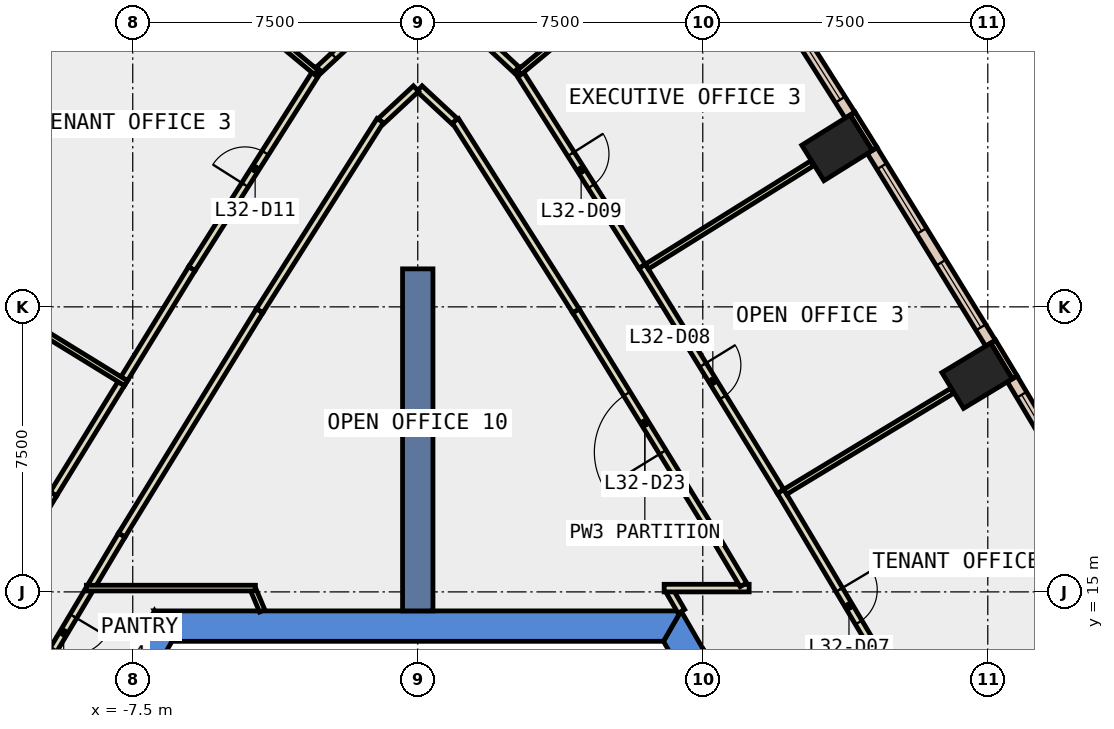
"""IFC4 building model, lengths in metres.
Left out: names, types, materials, properties, quantities, classifications, styles, units other than length and angle.
Written with IfcOpenShell. Run it as: python <this file> out.ifc"""

import sys

from ifc_helpers import new_model, si_unit, direction, frame, frame_2d, origin, origin_2d, place, context, subcontext, project, spatial, polyline, rectangle, outline, extrude, element, fill, save


model = new_model("IFC4")
c1 = context("Model", 3, precision=1e-05, world=origin(), true_north=direction((0.0, 1.0)))
c2 = subcontext(c1, "Body", "Model", "MODEL_VIEW")
j1 = project(units=[si_unit("LENGTHUNIT", "METRE"), si_unit("PLANEANGLEUNIT", "RADIAN")], contexts=[c1])
p1 = place(None, origin())
s1 = spatial("IfcSite", under=j1, at=p1, CompositionType="ELEMENT")
p2 = place(p1, origin())
s2 = spatial("IfcBuilding", under=s1, at=p2, CompositionType="ELEMENT")
p3 = place(p2, frame((0.0, 0.0, 146.6)))
s3 = spatial("IfcBuildingStorey", under=s2, at=p3, CompositionType="ELEMENT", Elevation=146.6)
for number, where, z_axis, x_axis in (
    (1, (14.719, 20.688, -0.4), (0.0, 0.0, 1.0), (-0.518, 0.855, 0.0)),
    (2, (11.033, 26.684, -0.4), (0.0, 0.0, 1.0), (-0.53, 0.848, 0.0)),
):
    element("IfcColumn", number, at=place(p3, frame(where, z_axis=z_axis, x_axis=x_axis)), inside=s3, PredefinedType="COLUMN", context=c2, shape_type="SweptSolid", body=[
        extrude(rectangle(XDim=1.1, YDim=1.5, at=origin_2d()), origin(), (0.0, 0.0, 1.0), 4.2),
    ])
p4 = place(p3, frame((0.0, 0.0, -0.4)))
e3 = element("IfcWall", 3, at=p4, inside=s3, PredefinedType="SHEAR", context=c2, shape_type="SweptSolid", body=[
    extrude(outline(polyline([(6.824, 13.08), (7.517, 13.48), (6.928, 14.5), (6.466, 13.7), (6.824, 13.08)])), origin(), (0.0, 0.0, 1.0), 4.2),
])
p5 = place(p3, frame((0.0, 0.0, -0.4)))
e4 = element("IfcWall", 4, at=p5, inside=s3, PredefinedType="SHEAR", context=c2, shape_type="SweptSolid", body=[
    extrude(outline(polyline([(6.928, 14.5), (-6.928, 14.5), (-6.466, 13.7), (6.466, 13.7), (6.928, 14.5)])), origin(), (0.0, 0.0, 1.0), 4.2),
])
p6 = place(p3, frame((0.0, 0.0, -0.4)))
e5 = element("IfcWall", 5, at=p6, inside=s3, PredefinedType="SHEAR", context=c2, shape_type="SweptSolid", body=[
    extrude(outline(polyline([(-12.267, 5.252), (-11.575, 4.852), (-6.466, 13.7), (-6.928, 14.5), (-12.267, 5.252)])), origin(), (0.0, 0.0, 1.0), 4.2),
])
p7 = place(p3, frame((0.0, 14.5, -0.4), z_axis=(0.0, 0.0, 1.0), x_axis=(0.0, 1.0, 0.0)))
e6 = element("IfcWall", 6, at=p7, inside=s3, PredefinedType="SHEAR", context=c2, shape_type="SweptSolid", body=[
    extrude(rectangle(XDim=9.0, YDim=0.8, at=frame_2d((4.5, 0.0))), origin(), (0.0, 0.0, 1.0), 4.2),
])
for number, where, z_axis, x_axis in (
    (7, (15.71, 20.645, 0.0), (0.0, 0.0, 1.0), (-0.518, 0.855, 0.0)),
    (8, (12.024, 26.655, 0.0), (0.0, 0.0, 1.0), (-0.53, 0.848, 0.0)),
):
    element("IfcWall", number, at=place(p3, frame(where, z_axis=z_axis, x_axis=x_axis)), inside=s3, PredefinedType="STANDARD", context=c2, shape_type="SweptSolid", body=[
        extrude(rectangle(XDim=1.1, YDim=0.15, at=frame_2d((0.55, 0.0))), origin(), (0.0, 0.0, 1.0), 3.8),
    ])
p8 = place(p3, frame((18.688, 15.493, 0.0), z_axis=(0.0, 0.0, 1.0), x_axis=(-0.511856715331, 0.859070836992, 0.0)))
e9 = element("IfcWall", 9, at=p8, inside=s3, PredefinedType="STANDARD", context=c2, shape_type="SweptSolid", body=[
    extrude(rectangle(XDim=5.951, YDim=0.3, at=frame_2d((2.975, 0.0))), origin(), (0.0, 0.0, 1.0), 3.8),
])
p9 = place(p8, frame((0.488, 0.0, 0.9)))
e10 = element("IfcOpeningElement", 10, at=p9, cuts=e9, PredefinedType="OPENING", context=c2, shape_type="SweptSolid", body=[
    extrude(rectangle(XDim=2.0, YDim=2.6, at=frame_2d((1.0, 1.3))), frame((0.0, 0.16, 0.0), z_axis=(0.0, -1.0, 0.0), x_axis=(1.0, 0.0, 0.0)), (0.0, 0.0, 1.0), 0.32),
])
p10 = place(p8, frame((3.463, 0.0, 0.9)))
e11 = element("IfcOpeningElement", 11, at=p10, cuts=e9, PredefinedType="OPENING", context=c2, shape_type="SweptSolid", body=[
    extrude(rectangle(XDim=2.0, YDim=2.6, at=frame_2d((1.0, 1.3))), frame((0.0, 0.16, 0.0), z_axis=(0.0, -1.0, 0.0), x_axis=(1.0, 0.0, 0.0)), (0.0, 0.0, 1.0), 0.32),
])
p11 = place(p3, frame((15.073, 21.544, 0.0), z_axis=(0.0, 0.0, 1.0), x_axis=(-0.523719731127, 0.851890628677, 0.0)))
e12 = element("IfcWall", 12, at=p11, inside=s3, PredefinedType="STANDARD", context=c2, shape_type="SweptSolid", body=[
    extrude(rectangle(XDim=5.952, YDim=0.3, at=frame_2d((2.976, 0.0))), origin(), (0.0, 0.0, 1.0), 3.8),
])
p12 = place(p11, frame((0.488, 0.0, 0.9)))
e13 = element("IfcOpeningElement", 13, at=p12, cuts=e12, PredefinedType="OPENING", context=c2, shape_type="SweptSolid", body=[
    extrude(rectangle(XDim=2.0, YDim=2.6, at=frame_2d((1.0, 1.3))), frame((0.0, 0.16, 0.0), z_axis=(0.0, -1.0, 0.0), x_axis=(1.0, 0.0, 0.0)), (0.0, 0.0, 1.0), 0.32),
])
p13 = place(p11, frame((3.464, 0.0, 0.9)))
e14 = element("IfcOpeningElement", 14, at=p13, cuts=e12, PredefinedType="OPENING", context=c2, shape_type="SweptSolid", body=[
    extrude(rectangle(XDim=2.0, YDim=2.6, at=frame_2d((1.0, 1.3))), frame((0.0, 0.16, 0.0), z_axis=(0.0, -1.0, 0.0), x_axis=(1.0, 0.0, 0.0)), (0.0, 0.0, 1.0), 0.32),
])
p14 = place(p3, frame((11.375, 27.545, 0.0), z_axis=(0.0, 0.0, 1.0), x_axis=(-0.535403761464, 0.844596242124, 0.0)))
e15 = element("IfcWall", 15, at=p14, inside=s3, PredefinedType="STANDARD", context=c2, shape_type="SweptSolid", body=[
    extrude(rectangle(XDim=5.928, YDim=0.3, at=frame_2d((2.964, 0.0))), origin(), (0.0, 0.0, 1.0), 3.8),
])
p15 = place(p14, frame((0.482, 0.0, 0.9)))
e16 = element("IfcOpeningElement", 16, at=p15, cuts=e15, PredefinedType="OPENING", context=c2, shape_type="SweptSolid", body=[
    extrude(rectangle(XDim=2.0, YDim=2.6, at=frame_2d((1.0, 1.3))), frame((0.0, 0.16, 0.0), z_axis=(0.0, -1.0, 0.0), x_axis=(1.0, 0.0, 0.0)), (0.0, 0.0, 1.0), 0.32),
])
p16 = place(p14, frame((3.446, 0.0, 0.9)))
e17 = element("IfcOpeningElement", 17, at=p16, cuts=e15, PredefinedType="OPENING", context=c2, shape_type="SweptSolid", body=[
    extrude(rectangle(XDim=2.0, YDim=2.6, at=frame_2d((1.0, 1.3))), frame((0.0, 0.16, 0.0), z_axis=(0.0, -1.0, 0.0), x_axis=(1.0, 0.0, 0.0)), (0.0, 0.0, 1.0), 0.32),
])
p17 = place(p3, frame((-8.201, 32.552, 0.0), z_axis=(0.0, 0.0, 1.0), x_axis=(-0.535403761464, -0.844596242124, 0.0)))
e18 = element("IfcWall", 18, at=p17, inside=s3, PredefinedType="STANDARD", context=c2, shape_type="SweptSolid", body=[
    extrude(rectangle(XDim=5.928, YDim=0.3, at=frame_2d((2.964, 0.0))), origin(), (0.0, 0.0, 1.0), 3.8),
])
p18 = place(p17, frame((0.482, 0.0, 0.9)))
e19 = element("IfcOpeningElement", 19, at=p18, cuts=e18, PredefinedType="OPENING", context=c2, shape_type="SweptSolid", body=[
    extrude(rectangle(XDim=2.0, YDim=2.6, at=frame_2d((1.0, 1.3))), frame((0.0, 0.16, 0.0), z_axis=(0.0, -1.0, 0.0), x_axis=(1.0, 0.0, 0.0)), (0.0, 0.0, 1.0), 0.32),
])
p19 = place(p17, frame((3.446, 0.0, 0.9)))
e20 = element("IfcOpeningElement", 20, at=p19, cuts=e18, PredefinedType="OPENING", context=c2, shape_type="SweptSolid", body=[
    extrude(rectangle(XDim=2.0, YDim=2.6, at=frame_2d((1.0, 1.3))), frame((0.0, 0.16, 0.0), z_axis=(0.0, -1.0, 0.0), x_axis=(1.0, 0.0, 0.0)), (0.0, 0.0, 1.0), 0.32),
])
p20 = place(p3, frame((-8.658, 15.036, 0.0), z_axis=(0.0, 0.0, 1.0), x_axis=(-0.511860217954, -0.859068750029, 0.0)))
e21 = element("IfcWall", 21, at=p20, inside=s3, PredefinedType="PARTITIONING", context=c2, shape_type="SweptSolid", body=[
    extrude(rectangle(XDim=2.577, YDim=0.2, at=frame_2d((1.289, 0.0))), origin(), (0.0, 0.0, 1.0), 3.8),
])
p21 = place(p20, frame((0.788, 0.0, 0.0)))
e22 = element("IfcOpeningElement", 22, at=p21, cuts=e21, PredefinedType="OPENING", context=c2, shape_type="SweptSolid", body=[
    extrude(rectangle(XDim=1.0, YDim=2.1, at=frame_2d((0.5, 1.05))), frame((0.0, 0.11, 0.0), z_axis=(0.0, -1.0, 0.0), x_axis=(1.0, 0.0, 0.0)), (0.0, 0.0, 1.0), 0.22),
])
p22 = place(p3, frame((6.937, 14.488, 0.0), z_axis=(0.0, 0.0, 1.0), x_axis=(-0.499908430952, 0.866078264744, 0.0)))
e23 = element("IfcWall", 23, at=p22, inside=s3, PredefinedType="PARTITIONING", context=c2, shape_type="SweptSolid", body=[
    extrude(rectangle(XDim=0.606, YDim=0.2, at=frame_2d((0.303, 0.0))), origin(), (0.0, 0.0, 1.0), 3.8),
])
p23 = place(p3, frame((6.484, 15.1, 0.0), z_axis=(0.0, 0.0, 1.0), x_axis=(1.0, 0.0, 0.0)))
e24 = element("IfcWall", 24, at=p23, inside=s3, PredefinedType="PARTITIONING", context=c2, shape_type="SweptSolid", body=[
    extrude(rectangle(XDim=2.236, YDim=0.2, at=frame_2d((1.118, 0.0))), origin(), (0.0, 0.0, 1.0), 3.8),
])
p24 = place(p3, frame((8.569, 15.186, 0.0), z_axis=(0.0, 0.0, 1.0), x_axis=(-0.512230585803, 0.85884796499, 0.0)))
e25 = element("IfcWall", 25, at=p24, inside=s3, PredefinedType="PARTITIONING", context=c2, shape_type="SweptSolid", body=[
    extrude(rectangle(XDim=1.523, YDim=0.2, at=frame_2d((0.761, 0.0))), origin(), (0.0, 0.0, 1.0), 3.8),
])
p25 = place(p3, frame((7.789, 16.494, 0.0), z_axis=(0.0, 0.0, 1.0), x_axis=(-0.523625371849, 0.851948631055, 0.0)))
e26 = element("IfcWall", 26, at=p25, inside=s3, PredefinedType="PARTITIONING", context=c2, shape_type="SweptSolid", body=[
    extrude(rectangle(XDim=6.927, YDim=0.2, at=frame_2d((3.463, 0.0))), origin(), (0.0, 0.0, 1.0), 3.8),
])
p26 = place(p25, frame((2.564, 0.0, 0.0)))
e27 = element("IfcOpeningElement", 27, at=p26, cuts=e26, PredefinedType="OPENING", context=c2, shape_type="SweptSolid", body=[
    extrude(rectangle(XDim=1.8, YDim=2.1, at=frame_2d((0.9, 1.05))), frame((0.0, 0.11, 0.0), z_axis=(0.0, -1.0, 0.0), x_axis=(1.0, 0.0, 0.0)), (0.0, 0.0, 1.0), 0.22),
])
p27 = place(p3, frame((4.162, 22.395, 0.0), z_axis=(0.0, 0.0, 1.0), x_axis=(-0.535496886312, 0.844537201519, 0.0)))
e28 = element("IfcWall", 28, at=p27, inside=s3, PredefinedType="PARTITIONING", context=c2, shape_type="SweptSolid", body=[
    extrude(rectangle(XDim=5.927, YDim=0.2, at=frame_2d((2.964, 0.0))), origin(), (0.0, 0.0, 1.0), 3.8),
])
for number, where, z_axis, x_axis in (
    (29, (0.968, 27.385, 0.0), (0.0, 0.0, 1.0), (-0.733, 0.681, 0.0)),
    (30, (-0.046, 28.242, 0.0), (0.0, 0.0, 1.0), (-0.733, -0.681, 0.0)),
):
    element("IfcWall", number, at=place(p3, frame(where, z_axis=z_axis, x_axis=x_axis)), inside=s3, PredefinedType="PARTITIONING", context=c2, shape_type="SweptSolid", body=[
        extrude(rectangle(XDim=1.259, YDim=0.2, at=frame_2d((0.629, 0.0))), origin(), (0.0, 0.0, 1.0), 3.8),
    ])
p28 = place(p3, frame((-0.988, 27.401, 0.0), z_axis=(0.0, 0.0, 1.0), x_axis=(-0.535496886312, -0.844537201519, 0.0)))
e31 = element("IfcWall", 31, at=p28, inside=s3, PredefinedType="PARTITIONING", context=c2, shape_type="SweptSolid", body=[
    extrude(rectangle(XDim=5.927, YDim=0.2, at=frame_2d((2.964, 0.0))), origin(), (0.0, 0.0, 1.0), 3.8),
])
p29 = place(p3, frame((-4.162, 22.395, 0.0), z_axis=(0.0, 0.0, 1.0), x_axis=(-0.523625371849, -0.851948631055, 0.0)))
e32 = element("IfcWall", 32, at=p29, inside=s3, PredefinedType="PARTITIONING", context=c2, shape_type="SweptSolid", body=[
    extrude(rectangle(XDim=6.927, YDim=0.2, at=frame_2d((3.463, 0.0))), origin(), (0.0, 0.0, 1.0), 3.8),
])
p30 = place(p3, frame((-7.789, 16.494, 0.0), z_axis=(0.0, 0.0, 1.0), x_axis=(-0.511686277462, -0.859172365394, 0.0)))
e33 = element("IfcWall", 33, at=p30, inside=s3, PredefinedType="PARTITIONING", context=c2, shape_type="SweptSolid", body=[
    extrude(rectangle(XDim=1.548, YDim=0.2, at=frame_2d((0.774, 0.0))), origin(), (0.0, 0.0, 1.0), 3.8),
])
p31 = place(p3, frame((9.548, 17.645, 0.0), z_axis=(0.0, 0.0, 1.0), x_axis=(0.511822081848, -0.859091471575, 0.0)))
e34 = element("IfcWall", 34, at=p31, inside=s3, PredefinedType="PARTITIONING", context=c2, shape_type="SweptSolid", body=[
    extrude(rectangle(XDim=7.03, YDim=0.2, at=frame_2d((3.515, 0.0))), origin(), (0.0, 0.0, 1.0), 3.8),
])
p32 = place(p31, frame((3.015, 0.0, 0.0)))
e35 = element("IfcOpeningElement", 35, at=p32, cuts=e34, PredefinedType="OPENING", context=c2, shape_type="SweptSolid", body=[
    extrude(rectangle(XDim=1.0, YDim=2.1, at=frame_2d((0.5, 1.05))), frame((0.0, 0.11, 0.0), z_axis=(0.0, -1.0, 0.0), x_axis=(1.0, 0.0, 0.0)), (0.0, 0.0, 1.0), 0.22),
])
p33 = place(p3, frame((5.904, 23.571, 0.0), z_axis=(0.0, 0.0, 1.0), x_axis=(0.523647026552, -0.851935321244, 0.0)))
e36 = element("IfcWall", 36, at=p33, inside=s3, PredefinedType="PARTITIONING", context=c2, shape_type="SweptSolid", body=[
    extrude(rectangle(XDim=6.957, YDim=0.2, at=frame_2d((3.479, 0.0))), origin(), (0.0, 0.0, 1.0), 3.8),
])
p34 = place(p33, frame((3.053, 0.0, 0.0)))
e37 = element("IfcOpeningElement", 37, at=p34, cuts=e36, PredefinedType="OPENING", context=c2, shape_type="SweptSolid", body=[
    extrude(rectangle(XDim=1.0, YDim=2.1, at=frame_2d((0.5, 1.05))), frame((0.0, 0.11, 0.0), z_axis=(0.0, -1.0, 0.0), x_axis=(1.0, 0.0, 0.0)), (0.0, 0.0, 1.0), 0.22),
])
p35 = place(p3, frame((2.616, 28.754, 0.0), z_axis=(0.0, 0.0, 1.0), x_axis=(0.535405016332, -0.844595446641, 0.0)))
e38 = element("IfcWall", 38, at=p35, inside=s3, PredefinedType="PARTITIONING", context=c2, shape_type="SweptSolid", body=[
    extrude(rectangle(XDim=6.138, YDim=0.2, at=frame_2d((3.069, 0.0))), origin(), (0.0, 0.0, 1.0), 3.8),
])
p36 = place(p35, frame((2.644, 0.0, 0.0)))
e39 = element("IfcOpeningElement", 39, at=p36, cuts=e38, PredefinedType="OPENING", context=c2, shape_type="SweptSolid", body=[
    extrude(rectangle(XDim=1.0, YDim=2.1, at=frame_2d((0.5, 1.05))), frame((0.0, 0.11, 0.0), z_axis=(0.0, -1.0, 0.0), x_axis=(1.0, 0.0, 0.0)), (0.0, 0.0, 1.0), 0.22),
])
p37 = place(p3, frame((-2.597, 28.738, 0.0), z_axis=(0.0, 0.0, 1.0), x_axis=(0.73206471367, 0.681235095249, 0.0)))
e40 = element("IfcWall", 40, at=p37, inside=s3, PredefinedType="PARTITIONING", context=c2, shape_type="SweptSolid", body=[
    extrude(rectangle(XDim=2.065, YDim=0.2, at=frame_2d((1.033, 0.0))), origin(), (0.0, 0.0, 1.0), 3.8),
])
p38 = place(p37, frame((0.532, 0.0, 0.0)))
e41 = element("IfcOpeningElement", 41, at=p38, cuts=e40, PredefinedType="OPENING", context=c2, shape_type="SweptSolid", body=[
    extrude(rectangle(XDim=1.0, YDim=2.1, at=frame_2d((0.5, 1.05))), frame((0.0, 0.11, 0.0), z_axis=(0.0, -1.0, 0.0), x_axis=(1.0, 0.0, 0.0)), (0.0, 0.0, 1.0), 0.22),
])
p39 = place(p3, frame((1.085, 30.145, 0.0), z_axis=(0.0, 0.0, 1.0), x_axis=(0.73206471367, -0.681235095249, 0.0)))
e42 = element("IfcWall", 42, at=p39, inside=s3, PredefinedType="PARTITIONING", context=c2, shape_type="SweptSolid", body=[
    extrude(rectangle(XDim=2.065, YDim=0.2, at=frame_2d((1.033, 0.0))), origin(), (0.0, 0.0, 1.0), 3.8),
])
p40 = place(p3, frame((-7.725, 20.608, 0.0), z_axis=(0.0, 0.0, 1.0), x_axis=(0.523645038298, 0.851936543333, 0.0)))
e43 = element("IfcWall", 43, at=p40, inside=s3, PredefinedType="PARTITIONING", context=c2, shape_type="SweptSolid", body=[
    extrude(rectangle(XDim=3.403, YDim=0.2, at=frame_2d((1.702, 0.0))), origin(), (0.0, 0.0, 1.0), 3.8),
])
p41 = place(p3, frame((-5.943, 23.507, 0.0), z_axis=(0.0, 0.0, 1.0), x_axis=(0.535529721247, 0.844516380931, 0.0)))
e44 = element("IfcWall", 44, at=p41, inside=s3, PredefinedType="PARTITIONING", context=c2, shape_type="SweptSolid", body=[
    extrude(rectangle(XDim=6.213, YDim=0.2, at=frame_2d((3.106, 0.0))), origin(), (0.0, 0.0, 1.0), 3.8),
])
p42 = place(p41, frame((2.607, 0.0, 0.0)))
e45 = element("IfcOpeningElement", 45, at=p42, cuts=e44, PredefinedType="OPENING", context=c2, shape_type="SweptSolid", body=[
    extrude(rectangle(XDim=1.0, YDim=2.1, at=frame_2d((0.5, 1.05))), frame((0.0, 0.11, 0.0), z_axis=(0.0, -1.0, 0.0), x_axis=(1.0, 0.0, 0.0)), (0.0, 0.0, 1.0), 0.22),
])
p43 = place(p3, frame((-13.184, 11.542, 0.0), z_axis=(0.0, 0.0, 1.0), x_axis=(0.511847713534, 0.859076200433, 0.0)))
e46 = element("IfcWall", 46, at=p43, inside=s3, PredefinedType="PARTITIONING", context=c2, shape_type="SweptSolid", body=[
    extrude(rectangle(XDim=7.03, YDim=0.2, at=frame_2d((3.515, 0.0))), origin(), (0.0, 0.0, 1.0), 3.8),
])
p44 = place(p43, frame((3.015, 0.0, 0.0)))
e47 = element("IfcOpeningElement", 47, at=p44, cuts=e46, PredefinedType="OPENING", context=c2, shape_type="SweptSolid", body=[
    extrude(rectangle(XDim=1.0, YDim=2.1, at=frame_2d((0.5, 1.05))), frame((0.0, 0.11, 0.0), z_axis=(0.0, -1.0, 0.0), x_axis=(1.0, 0.0, 0.0)), (0.0, 0.0, 1.0), 0.22),
])
p45 = place(p3, frame((-9.586, 17.581, 0.0), z_axis=(0.0, 0.0, 1.0), x_axis=(0.523757261565, 0.851867554822, 0.0)))
e48 = element("IfcWall", 48, at=p45, inside=s3, PredefinedType="PARTITIONING", context=c2, shape_type="SweptSolid", body=[
    extrude(rectangle(XDim=3.404, YDim=0.2, at=frame_2d((1.702, 0.0))), origin(), (0.0, 0.0, 1.0), 3.8),
])
p46 = place(p3, frame((-4.272, 15.1, 0.0), z_axis=(0.0, 0.0, 1.0), x_axis=(-1.0, 0.0, 0.0)))
e49 = element("IfcWall", 49, at=p46, inside=s3, PredefinedType="PARTITIONING", context=c2, shape_type="SweptSolid", body=[
    extrude(rectangle(XDim=4.448, YDim=0.15, at=frame_2d((2.224, 0.0))), origin(), (0.0, 0.0, 1.0), 3.8),
])
p47 = place(p3, frame((-4.093, 14.5, 0.0), z_axis=(0.0, 0.0, 1.0), x_axis=(-0.390288929197, 0.92069243059, 0.0)))
e50 = element("IfcWall", 50, at=p47, inside=s3, PredefinedType="PARTITIONING", context=c2, shape_type="SweptSolid", body=[
    extrude(rectangle(XDim=0.577, YDim=0.15, at=frame_2d((0.288, 0.0))), origin(), (0.0, 0.0, 1.0), 3.8),
])
p48 = place(p3, frame((9.671, 17.633, 0.0), z_axis=(0.0, 0.0, 1.0), x_axis=(0.855551112805, 0.517718353332, 0.0)))
e51 = element("IfcWall", 51, at=p48, inside=s3, PredefinedType="PARTITIONING", context=c2, shape_type="SweptSolid", body=[
    extrude(rectangle(XDim=5.13, YDim=0.15, at=frame_2d((2.565, 0.0))), origin(), (0.0, 0.0, 1.0), 3.8),
])
p49 = place(p3, frame((6.028, 23.56, 0.0), z_axis=(0.0, 0.0, 1.0), x_axis=(0.848246841914, 0.529601071734, 0.0)))
e52 = element("IfcWall", 52, at=p49, inside=s3, PredefinedType="PARTITIONING", context=c2, shape_type="SweptSolid", body=[
    extrude(rectangle(XDim=5.13, YDim=0.15, at=frame_2d((2.565, 0.0))), origin(), (0.0, 0.0, 1.0), 3.8),
])
for number, where, z_axis, x_axis in (
    (53, (2.67, 28.67, 0.0), (0.0, 0.0, 1.0), (0.769, 0.639, 0.0)),
    (54, (-2.67, 28.67, 0.0), (0.0, 0.0, 1.0), (-0.769, 0.639, 0.0)),
):
    element("IfcWall", number, at=place(p3, frame(where, z_axis=z_axis, x_axis=x_axis)), inside=s3, PredefinedType="PARTITIONING", context=c2, shape_type="SweptSolid", body=[
        extrude(rectangle(XDim=5.288, YDim=0.15, at=frame_2d((2.644, 0.0))), origin(), (0.0, 0.0, 1.0), 3.8),
    ])
p50 = place(p3, frame((-7.679, 20.492, 0.0), z_axis=(0.0, 0.0, 1.0), x_axis=(-0.851897179877, 0.523709074695, 0.0)))
e55 = element("IfcWall", 55, at=p50, inside=s3, PredefinedType="PARTITIONING", context=c2, shape_type="SweptSolid", body=[
    extrude(rectangle(XDim=6.7, YDim=0.15, at=frame_2d((3.35, 0.0))), origin(), (0.0, 0.0, 1.0), 3.8),
])
p51 = place(p10, origin())
e56 = element("IfcWindow", 56, at=p51, inside=s3, PartitioningType="SINGLE_PANEL", PredefinedType="WINDOW", context=c2, shape_type="SweptSolid", body=[
    extrude(rectangle(XDim=2.0, YDim=2.6, at=frame_2d((1.0, 1.3))), frame((0.0, 0.03, 0.0), z_axis=(0.0, -1.0, 0.0), x_axis=(1.0, 0.0, 0.0)), (0.0, 0.0, 1.0), 0.06),
])
fill(e11, e56)
p52 = place(p12, origin())
e57 = element("IfcWindow", 57, at=p52, inside=s3, PartitioningType="SINGLE_PANEL", PredefinedType="WINDOW", context=c2, shape_type="SweptSolid", body=[
    extrude(rectangle(XDim=2.0, YDim=2.6, at=frame_2d((1.0, 1.3))), frame((0.0, 0.03, 0.0), z_axis=(0.0, -1.0, 0.0), x_axis=(1.0, 0.0, 0.0)), (0.0, 0.0, 1.0), 0.06),
])
fill(e13, e57)
p53 = place(p13, origin())
e58 = element("IfcWindow", 58, at=p53, inside=s3, PartitioningType="SINGLE_PANEL", PredefinedType="WINDOW", context=c2, shape_type="SweptSolid", body=[
    extrude(rectangle(XDim=2.0, YDim=2.6, at=frame_2d((1.0, 1.3))), frame((0.0, 0.03, 0.0), z_axis=(0.0, -1.0, 0.0), x_axis=(1.0, 0.0, 0.0)), (0.0, 0.0, 1.0), 0.06),
])
fill(e14, e58)
p54 = place(p15, origin())
e59 = element("IfcWindow", 59, at=p54, inside=s3, PartitioningType="SINGLE_PANEL", PredefinedType="WINDOW", context=c2, shape_type="SweptSolid", body=[
    extrude(rectangle(XDim=2.0, YDim=2.6, at=frame_2d((1.0, 1.3))), frame((0.0, 0.03, 0.0), z_axis=(0.0, -1.0, 0.0), x_axis=(1.0, 0.0, 0.0)), (0.0, 0.0, 1.0), 0.06),
])
fill(e16, e59)
p55 = place(p32, origin())
e60 = element("IfcDoor", 60, at=p55, inside=s3, OperationType="SINGLE_SWING_RIGHT", PredefinedType="DOOR", context=c2, shape_type="SweptSolid", body=[
    extrude(rectangle(XDim=1.0, YDim=2.1, at=frame_2d((0.5, 1.05))), frame((0.0, 0.025, 0.0), z_axis=(0.0, -1.0, 0.0), x_axis=(1.0, 0.0, 0.0)), (0.0, 0.0, 1.0), 0.05),
])
fill(e35, e60)
p56 = place(p34, origin())
e61 = element("IfcDoor", 61, at=p56, inside=s3, OperationType="SINGLE_SWING_LEFT", PredefinedType="DOOR", context=c2, shape_type="SweptSolid", body=[
    extrude(rectangle(XDim=1.0, YDim=2.1, at=frame_2d((0.5, 1.05))), frame((0.0, 0.025, 0.0), z_axis=(0.0, -1.0, 0.0), x_axis=(1.0, 0.0, 0.0)), (0.0, 0.0, 1.0), 0.05),
])
fill(e37, e61)
p57 = place(p36, origin())
e62 = element("IfcDoor", 62, at=p57, inside=s3, OperationType="SINGLE_SWING_LEFT", PredefinedType="DOOR", context=c2, shape_type="SweptSolid", body=[
    extrude(rectangle(XDim=1.0, YDim=2.1, at=frame_2d((0.5, 1.05))), frame((0.0, 0.025, 0.0), z_axis=(0.0, -1.0, 0.0), x_axis=(1.0, 0.0, 0.0)), (0.0, 0.0, 1.0), 0.05),
])
fill(e39, e62)
p58 = place(p38, origin())
e63 = element("IfcDoor", 63, at=p58, inside=s3, OperationType="SINGLE_SWING_LEFT", PredefinedType="DOOR", context=c2, shape_type="SweptSolid", body=[
    extrude(rectangle(XDim=1.0, YDim=2.1, at=frame_2d((0.5, 1.05))), frame((0.0, 0.025, 0.0), z_axis=(0.0, -1.0, 0.0), x_axis=(1.0, 0.0, 0.0)), (0.0, 0.0, 1.0), 0.05),
])
fill(e41, e63)
p59 = place(p42, origin())
e64 = element("IfcDoor", 64, at=p59, inside=s3, OperationType="SINGLE_SWING_LEFT", PredefinedType="DOOR", context=c2, shape_type="SweptSolid", body=[
    extrude(rectangle(XDim=1.0, YDim=2.1, at=frame_2d((0.5, 1.05))), frame((0.0, 0.025, 0.0), z_axis=(0.0, -1.0, 0.0), x_axis=(1.0, 0.0, 0.0)), (0.0, 0.0, 1.0), 0.05),
])
fill(e45, e64)
p60 = place(p26, origin())
e65 = element("IfcDoor", 65, at=p60, inside=s3, OperationType="DOUBLE_DOOR_SINGLE_SWING", PredefinedType="DOOR", context=c2, shape_type="SweptSolid", body=[
    extrude(rectangle(XDim=1.8, YDim=2.1, at=frame_2d((0.9, 1.05))), frame((0.0, 0.025, 0.0), z_axis=(0.0, -1.0, 0.0), x_axis=(1.0, 0.0, 0.0)), (0.0, 0.0, 1.0), 0.05),
])
fill(e27, e65)
p61 = place(p21, origin())
e66 = element("IfcDoor", 66, at=p61, inside=s3, OperationType="SINGLE_SWING_LEFT", PredefinedType="DOOR", context=c2, shape_type="SweptSolid", body=[
    extrude(rectangle(XDim=1.0, YDim=2.1, at=frame_2d((0.5, 1.05))), frame((0.0, 0.025, 0.0), z_axis=(0.0, -1.0, 0.0), x_axis=(1.0, 0.0, 0.0)), (0.0, 0.0, 1.0), 0.05),
])
fill(e22, e66)
save(model, sys.argv[1])
